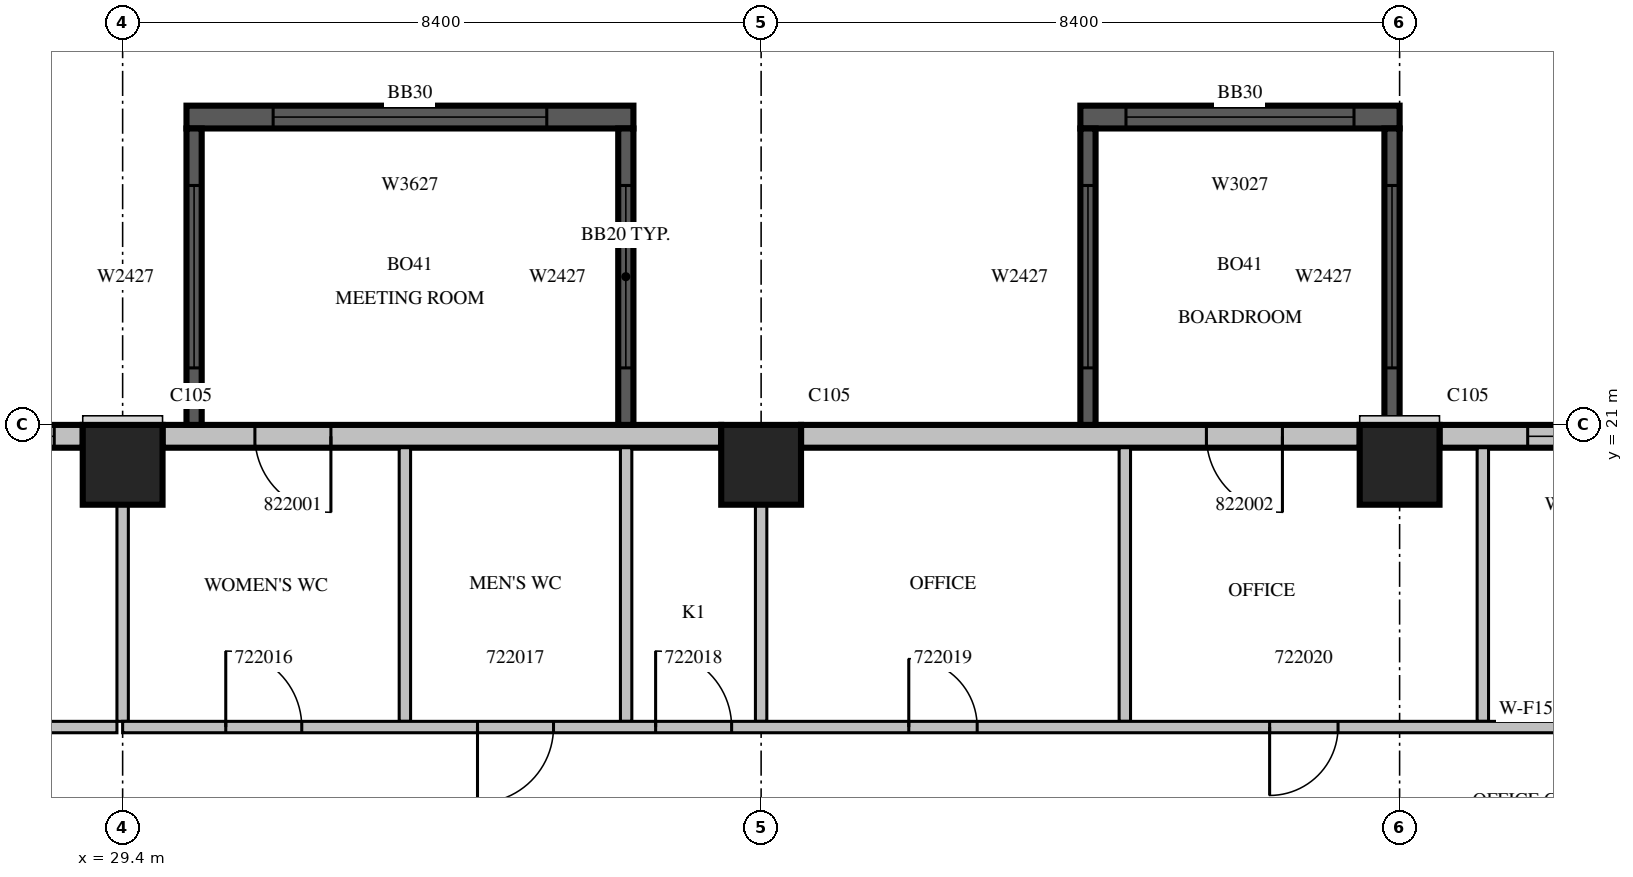
"""IFC4 building model, lengths in metres.
Left out: names, types, materials, properties, quantities, classifications, styles, units other than length and angle.
Written with IfcOpenShell. Run it as: python <this file> out.ifc"""

import sys

from ifc_helpers import new_model, si_unit, direction, frame, frame_2d, origin, origin_2d, place, context, subcontext, project, spatial, rectangle, extrude, source, transform, mapped, element, fill, save


model = new_model("IFC4")
c1 = context("Model", 3, precision=1e-05, world=origin(), true_north=direction((0.0, 1.0)))
c2 = subcontext(c1, "Body", "Model", "MODEL_VIEW")
j1 = project(units=[si_unit("LENGTHUNIT", "METRE"), si_unit("PLANEANGLEUNIT", "RADIAN")], contexts=[c1])
p1 = place(None, origin())
s1 = spatial("IfcSite", under=j1, at=p1, CompositionType="ELEMENT")
p2 = place(p1, origin())
s2 = spatial("IfcBuilding", under=s1, at=p2, CompositionType="ELEMENT")
p3 = place(p2, frame((0.0, 0.0, 103.5)))
s3 = spatial("IfcBuildingStorey", under=s2, at=p3, CompositionType="ELEMENT", Elevation=103.5)
m1 = source(origin(), c2, "Body", "SweptSolid", [
    extrude(rectangle(XDim=1.05, YDim=1.05, at=origin_2d()), origin(), (0.0, 0.0, 1.0), 4.2),
])
for number, where, z_axis, x_axis in (
    (1, (29.4, 20.475, 0.0), (0.0, 0.0, 1.0), (1.0, 0.0, 0.0)),
    (2, (37.8, 20.475, 0.0), (0.0, 0.0, 1.0), (1.0, 0.0, 0.0)),
    (3, (46.2, 20.475, 0.0), (0.0, 0.0, 1.0), (1.0, 0.0, 0.0)),
):
    element("IfcColumn", number, at=place(p3, frame(where, z_axis=z_axis, x_axis=x_axis)), inside=s3, PredefinedType="COLUMN", context=c2, shape_type="MappedRepresentation", body=[
        mapped(m1, transform((0.0, 0.0, 0.0), scale=1.0)),
    ])
m2 = source(origin(), c2, "Body", "SweptSolid", [
    extrude(rectangle(XDim=4.83, YDim=0.3, at=frame_2d((2.415, 0.0))), origin(), (0.0, 0.0, 1.0), 3.8),
])
p4 = place(p3, frame((51.555, 20.85, 0.0), z_axis=(0.0, 0.0, 1.0), x_axis=(-1.0, 0.0, 0.0)))
e4 = element("IfcWall", 4, at=p4, inside=s3, PredefinedType="STANDARD", context=c2, shape_type="MappedRepresentation", body=[
    mapped(m2, transform((0.0, 0.0, 0.0), scale=1.0)),
])
m3 = source(origin(), c2, "Body", "SweptSolid", [
    extrude(rectangle(XDim=1.2, YDim=2.7, at=frame_2d((0.6, 1.35))), frame((0.0, 0.16, 0.0), z_axis=(0.0, -1.0, 0.0), x_axis=(1.0, 0.0, 0.0)), (0.0, 0.0, 1.0), 0.32),
])
p5 = place(p4, frame((2.47, 0.0, 0.6)))
e5 = element("IfcOpeningElement", 5, at=p5, cuts=e4, PredefinedType="OPENING", context=c2, shape_type="MappedRepresentation", body=[
    mapped(m3, transform((0.0, 0.0, 0.0), scale=1.0)),
])
m4 = source(origin(), c2, "Body", "SweptSolid", [
    extrude(rectangle(XDim=7.35, YDim=0.3, at=frame_2d((3.675, 0.0))), origin(), (0.0, 0.0, 1.0), 3.8),
])
p6 = place(p3, frame((45.675, 20.85, 0.0), z_axis=(0.0, 0.0, 1.0), x_axis=(-1.0, 0.0, 0.0)))
e6 = element("IfcWall", 6, at=p6, inside=s3, PredefinedType="STANDARD", context=c2, shape_type="MappedRepresentation", body=[
    mapped(m4, transform((0.0, 0.0, 0.0), scale=1.0)),
])
m5 = source(origin(), c2, "Body", "SweptSolid", [
    extrude(rectangle(XDim=1.0, YDim=2.1, at=frame_2d((0.5, 1.05))), frame((0.0, 0.16, 0.0), z_axis=(0.0, -1.0, 0.0), x_axis=(1.0, 0.0, 0.0)), (0.0, 0.0, 1.0), 0.32),
])
p7 = place(p6, frame((1.017, 0.0, 0.0)))
e7 = element("IfcOpeningElement", 7, at=p7, cuts=e6, PredefinedType="OPENING", context=c2, shape_type="MappedRepresentation", body=[
    mapped(m5, transform((0.0, 0.0, 0.0), scale=1.0)),
])
p8 = place(p3, frame((37.275, 20.85, 0.0), z_axis=(0.0, 0.0, 1.0), x_axis=(-1.0, 0.0, 0.0)))
e8 = element("IfcWall", 8, at=p8, inside=s3, PredefinedType="STANDARD", context=c2, shape_type="MappedRepresentation", body=[
    mapped(m4, transform((0.0, 0.0, 0.0), scale=1.0)),
])
p9 = place(p8, frame((5.135, 0.0, 0.0)))
e9 = element("IfcOpeningElement", 9, at=p9, cuts=e8, PredefinedType="OPENING", context=c2, shape_type="MappedRepresentation", body=[
    mapped(m5, transform((0.0, 0.0, 0.0), scale=1.0)),
])
m6 = source(origin(), c2, "Body", "SweptSolid", [
    extrude(rectangle(XDim=6.875, YDim=0.3, at=frame_2d((3.438, 0.0))), origin(), (0.0, 0.0, 1.0), 3.8),
])
p10 = place(p3, frame((28.875, 20.85, 0.0), z_axis=(0.0, 0.0, 1.0), x_axis=(-1.0, 0.0, 0.0)))
e10 = element("IfcWall", 10, at=p10, inside=s3, PredefinedType="STANDARD", context=c2, shape_type="MappedRepresentation", body=[
    mapped(m6, transform((0.0, 0.0, 0.0), scale=1.0)),
])
m7 = source(origin(), c2, "Body", "SweptSolid", [
    extrude(rectangle(XDim=2.4, YDim=2.7, at=frame_2d((1.2, 1.35))), frame((0.0, 0.16, 0.0), z_axis=(0.0, -1.0, 0.0), x_axis=(1.0, 0.0, 0.0)), (0.0, 0.0, 1.0), 0.32),
])
p11 = place(p10, frame((0.375, 0.0, 0.6)))
e11 = element("IfcOpeningElement", 11, at=p11, cuts=e10, PredefinedType="OPENING", context=c2, shape_type="MappedRepresentation", body=[
    mapped(m7, transform((0.0, 0.0, 0.0), scale=1.0)),
])
m8 = source(origin(), c2, "Body", "SweptSolid", [
    extrude(rectangle(XDim=1.8, YDim=2.7, at=frame_2d((0.9, 1.35))), frame((0.0, 0.16, 0.0), z_axis=(0.0, -1.0, 0.0), x_axis=(1.0, 0.0, 0.0)), (0.0, 0.0, 1.0), 0.32),
])
p12 = place(p10, frame((3.938, 0.0, 0.6)))
e12 = element("IfcOpeningElement", 12, at=p12, cuts=e10, PredefinedType="OPENING", context=c2, shape_type="MappedRepresentation", body=[
    mapped(m8, transform((0.0, 0.0, 0.0), scale=1.0)),
])
m9 = source(origin(), c2, "Body", "SweptSolid", [
    extrude(rectangle(XDim=5.88, YDim=0.3, at=frame_2d((2.94, 0.0))), origin(), (0.0, 0.0, 1.0), 3.79),
])
p13 = place(p3, frame((36.12, 25.05, 0.0), z_axis=(0.0, 0.0, 1.0), x_axis=(-1.0, 0.0, 0.0)))
e13 = element("IfcWall", 13, at=p13, inside=s3, PredefinedType="SOLIDWALL", context=c2, shape_type="MappedRepresentation", body=[
    mapped(m9, transform((0.0, 0.0, 0.0), scale=1.0)),
])
m10 = source(origin(), c2, "Body", "SweptSolid", [
    extrude(rectangle(XDim=3.6, YDim=2.7, at=frame_2d((1.8, 1.35))), frame((0.0, 0.16, 0.0), z_axis=(0.0, -1.0, 0.0), x_axis=(1.0, 0.0, 0.0)), (0.0, 0.0, 1.0), 0.32),
])
p14 = place(p13, frame((1.14, 0.0, 0.6)))
e14 = element("IfcOpeningElement", 14, at=p14, cuts=e13, PredefinedType="OPENING", context=c2, shape_type="MappedRepresentation", body=[
    mapped(m10, transform((0.0, 0.0, 0.0), scale=1.0)),
])
m11 = source(origin(), c2, "Body", "SweptSolid", [
    extrude(rectangle(XDim=3.9, YDim=0.2, at=frame_2d((1.95, 0.0))), origin(), (0.0, 0.0, 1.0), 3.79),
])
p15 = place(p3, frame((36.02, 21.0, 0.0), z_axis=(0.0, 0.0, 1.0), x_axis=(0.0, 1.0, 0.0)))
e15 = element("IfcWall", 15, at=p15, inside=s3, PredefinedType="SOLIDWALL", context=c2, shape_type="MappedRepresentation", body=[
    mapped(m11, transform((0.0, 0.0, 0.0), scale=1.0)),
])
m12 = source(origin(), c2, "Body", "SweptSolid", [
    extrude(rectangle(XDim=2.4, YDim=2.7, at=frame_2d((1.2, 1.35))), frame((0.0, 0.11, 0.0), z_axis=(0.0, -1.0, 0.0), x_axis=(1.0, 0.0, 0.0)), (0.0, 0.0, 1.0), 0.22),
])
p16 = place(p15, frame((0.75, 0.0, 0.6)))
e16 = element("IfcOpeningElement", 16, at=p16, cuts=e15, PredefinedType="OPENING", context=c2, shape_type="MappedRepresentation", body=[
    mapped(m12, transform((0.0, 0.0, 0.0), scale=1.0)),
])
p17 = place(p3, frame((30.34, 21.0, 0.0), z_axis=(0.0, 0.0, 1.0), x_axis=(0.0, 1.0, 0.0)))
e17 = element("IfcWall", 17, at=p17, inside=s3, PredefinedType="SOLIDWALL", context=c2, shape_type="MappedRepresentation", body=[
    mapped(m11, transform((0.0, 0.0, 0.0), scale=1.0)),
])
p18 = place(p17, frame((0.75, 0.0, 0.6)))
e18 = element("IfcOpeningElement", 18, at=p18, cuts=e17, PredefinedType="OPENING", context=c2, shape_type="MappedRepresentation", body=[
    mapped(m12, transform((0.0, 0.0, 0.0), scale=1.0)),
])
m13 = source(origin(), c2, "Body", "SweptSolid", [
    extrude(rectangle(XDim=4.2, YDim=0.3, at=frame_2d((2.1, 0.0))), origin(), (0.0, 0.0, 1.0), 3.79),
])
p19 = place(p3, frame((46.2, 25.05, 0.0), z_axis=(0.0, 0.0, 1.0), x_axis=(-1.0, 0.0, 0.0)))
e19 = element("IfcWall", 19, at=p19, inside=s3, PredefinedType="SOLIDWALL", context=c2, shape_type="MappedRepresentation", body=[
    mapped(m13, transform((0.0, 0.0, 0.0), scale=1.0)),
])
m14 = source(origin(), c2, "Body", "SweptSolid", [
    extrude(rectangle(XDim=3.0, YDim=2.7, at=frame_2d((1.5, 1.35))), frame((0.0, 0.16, 0.0), z_axis=(0.0, -1.0, 0.0), x_axis=(1.0, 0.0, 0.0)), (0.0, 0.0, 1.0), 0.32),
])
p20 = place(p19, frame((0.6, 0.0, 0.6)))
e20 = element("IfcOpeningElement", 20, at=p20, cuts=e19, PredefinedType="OPENING", context=c2, shape_type="MappedRepresentation", body=[
    mapped(m14, transform((0.0, 0.0, 0.0), scale=1.0)),
])
p21 = place(p3, frame((46.1, 21.0, 0.0), z_axis=(0.0, 0.0, 1.0), x_axis=(0.0, 1.0, 0.0)))
e21 = element("IfcWall", 21, at=p21, inside=s3, PredefinedType="SOLIDWALL", context=c2, shape_type="MappedRepresentation", body=[
    mapped(m11, transform((0.0, 0.0, 0.0), scale=1.0)),
])
p22 = place(p21, frame((0.75, 0.0, 0.6)))
e22 = element("IfcOpeningElement", 22, at=p22, cuts=e21, PredefinedType="OPENING", context=c2, shape_type="MappedRepresentation", body=[
    mapped(m12, transform((0.0, 0.0, 0.0), scale=1.0)),
])
p23 = place(p3, frame((42.1, 21.0, 0.0), z_axis=(0.0, 0.0, 1.0), x_axis=(0.0, 1.0, 0.0)))
e23 = element("IfcWall", 23, at=p23, inside=s3, PredefinedType="SOLIDWALL", context=c2, shape_type="MappedRepresentation", body=[
    mapped(m11, transform((0.0, 0.0, 0.0), scale=1.0)),
])
p24 = place(p23, frame((0.75, 0.0, 0.6)))
e24 = element("IfcOpeningElement", 24, at=p24, cuts=e23, PredefinedType="OPENING", context=c2, shape_type="MappedRepresentation", body=[
    mapped(m12, transform((0.0, 0.0, 0.0), scale=1.0)),
])
m15 = source(origin(), c2, "Body", "SweptSolid", [
    extrude(rectangle(XDim=3.85, YDim=0.15, at=frame_2d((1.925, 0.0))), origin(), (0.0, 0.0, 1.0), 3.8),
])
p25 = place(p3, frame((25.475, 17.025, 0.0), z_axis=(0.0, 0.0, 1.0), x_axis=(1.0, 0.0, 0.0)))
e25 = element("IfcWall", 25, at=p25, inside=s3, PredefinedType="PARTITIONING", context=c2, shape_type="MappedRepresentation", body=[
    mapped(m15, transform((0.0, 0.0, 0.0), scale=1.0)),
])
p26 = place(p3, frame((29.4, 17.1, 0.0), z_axis=(0.0, 0.0, 1.0), x_axis=(0.0, 1.0, 0.0)))
e26 = element("IfcWall", 26, at=p26, inside=s3, PredefinedType="PARTITIONING", context=c2, shape_type="SweptSolid", body=[
    extrude(rectangle(XDim=2.851, YDim=0.15, at=frame_2d((1.425, 0.0))), origin(), (0.0, 0.0, 1.0), 3.8),
])
m16 = source(origin(), c2, "Body", "SweptSolid", [
    extrude(rectangle(XDim=3.6, YDim=0.15, at=frame_2d((1.8, 0.0))), origin(), (0.0, 0.0, 1.0), 3.8),
])
for number, where, z_axis, x_axis in (
    (27, (33.113, 20.7, 0.0), (0.0, 0.0, 1.0), (0.0, -1.0, 0.0)),
    (28, (36.024, 20.7, 0.0), (0.0, 0.0, 1.0), (0.0, -1.0, 0.0)),
    (29, (42.585, 20.7, 0.0), (0.0, 0.0, 1.0), (0.0, -1.0, 0.0)),
    (30, (47.295, 20.7, 0.0), (0.0, 0.0, 1.0), (0.0, -1.0, 0.0)),
):
    element("IfcWall", number, at=place(p3, frame(where, z_axis=z_axis, x_axis=x_axis)), inside=s3, PredefinedType="PARTITIONING", context=c2, shape_type="MappedRepresentation", body=[
        mapped(m16, transform((0.0, 0.0, 0.0), scale=1.0)),
    ])
m17 = source(origin(), c2, "Body", "SweptSolid", [
    extrude(rectangle(XDim=2.851, YDim=0.15, at=frame_2d((1.425, 0.0))), origin(), (0.0, 0.0, 1.0), 3.8),
])
p27 = place(p3, frame((37.8, 17.1, 0.0), z_axis=(0.0, 0.0, 1.0), x_axis=(0.0, 1.0, 0.0)))
e31 = element("IfcWall", 31, at=p27, inside=s3, PredefinedType="PARTITIONING", context=c2, shape_type="MappedRepresentation", body=[
    mapped(m17, transform((0.0, 0.0, 0.0), scale=1.0)),
])
m18 = source(origin(), c2, "Body", "SweptSolid", [
    extrude(rectangle(XDim=37.5, YDim=0.15, at=frame_2d((18.75, 0.0))), origin(), (0.0, 0.0, 1.0), 3.8),
])
p28 = place(p3, frame((29.4, 17.025, 0.0), z_axis=(0.0, 0.0, 1.0), x_axis=(1.0, 0.0, 0.0)))
e32 = element("IfcWall", 32, at=p28, inside=s3, PredefinedType="PARTITIONING", context=c2, shape_type="MappedRepresentation", body=[
    mapped(m18, transform((0.0, 0.0, 0.0), scale=1.0)),
])
m19 = source(origin(), c2, "Body", "SweptSolid", [
    extrude(rectangle(XDim=1.0, YDim=2.1, at=frame_2d((0.5, 1.05))), frame((0.0, 0.085, 0.0), z_axis=(0.0, -1.0, 0.0), x_axis=(1.0, 0.0, 0.0)), (0.0, 0.0, 1.0), 0.17),
])
p29 = place(p28, frame((1.357, 0.0, 0.0)))
e33 = element("IfcOpeningElement", 33, at=p29, cuts=e32, PredefinedType="OPENING", context=c2, shape_type="MappedRepresentation", body=[
    mapped(m19, transform((0.0, 0.0, 0.0), scale=1.0)),
])
p30 = place(p28, frame((4.669, 0.0, 0.0)))
e34 = element("IfcOpeningElement", 34, at=p30, cuts=e32, PredefinedType="OPENING", context=c2, shape_type="MappedRepresentation", body=[
    mapped(m19, transform((0.0, 0.0, 0.0), scale=1.0)),
])
p31 = place(p28, frame((7.012, 0.0, 0.0)))
e35 = element("IfcOpeningElement", 35, at=p31, cuts=e32, PredefinedType="OPENING", context=c2, shape_type="MappedRepresentation", body=[
    mapped(m19, transform((0.0, 0.0, 0.0), scale=1.0)),
])
m20 = source(origin(), c2, "Body", "SweptSolid", [
    extrude(rectangle(XDim=0.9, YDim=2.1, at=frame_2d((0.45, 1.05))), frame((0.0, 0.085, 0.0), z_axis=(0.0, -1.0, 0.0), x_axis=(1.0, 0.0, 0.0)), (0.0, 0.0, 1.0), 0.17),
])
p32 = place(p28, frame((10.342, 0.0, 0.0)))
e36 = element("IfcOpeningElement", 36, at=p32, cuts=e32, PredefinedType="OPENING", context=c2, shape_type="MappedRepresentation", body=[
    mapped(m20, transform((0.0, 0.0, 0.0), scale=1.0)),
])
p33 = place(p28, frame((15.09, 0.0, 0.0)))
e37 = element("IfcOpeningElement", 37, at=p33, cuts=e32, PredefinedType="OPENING", context=c2, shape_type="MappedRepresentation", body=[
    mapped(m20, transform((0.0, 0.0, 0.0), scale=1.0)),
])
p34 = place(p28, frame((19.837, 0.0, 0.0)))
e38 = element("IfcOpeningElement", 38, at=p34, cuts=e32, PredefinedType="OPENING", context=c2, shape_type="MappedRepresentation", body=[
    mapped(m20, transform((0.0, 0.0, 0.0), scale=1.0)),
])
m21 = source(origin(), c2, "Body", "SweptSolid", [
    extrude(rectangle(XDim=1.2, YDim=2.1, at=frame_2d((0.6, 1.05))), frame((0.0, 0.085, 0.0), z_axis=(0.0, -1.0, 0.0), x_axis=(1.0, 0.0, 0.0)), (0.0, 0.0, 1.0), 0.17),
])
p35 = place(p28, frame((25.804, 0.0, 0.0)))
e39 = element("IfcOpeningElement", 39, at=p35, cuts=e32, PredefinedType="OPENING", context=c2, shape_type="MappedRepresentation", body=[
    mapped(m21, transform((0.0, 0.0, 0.0), scale=1.0)),
])
p36 = place(p28, frame((33.251, 0.0, 0.0)))
e40 = element("IfcOpeningElement", 40, at=p36, cuts=e32, PredefinedType="OPENING", context=c2, shape_type="MappedRepresentation", body=[
    mapped(m21, transform((0.0, 0.0, 0.0), scale=1.0)),
])
m22 = source(origin(), c2, "Body", "SweptSolid", [
    extrude(rectangle(XDim=1.2, YDim=2.7, at=frame_2d((0.6, 1.35))), frame((0.0, 0.03, 0.0), z_axis=(0.0, -1.0, 0.0), x_axis=(1.0, 0.0, 0.0)), (0.0, 0.0, 1.0), 0.06),
])
p37 = place(p5, origin())
e41 = element("IfcWindow", 41, at=p37, inside=s3, PartitioningType="SINGLE_PANEL", PredefinedType="WINDOW", context=c2, shape_type="MappedRepresentation", body=[
    mapped(m22, transform((0.0, 0.0, 0.0), scale=1.0)),
])
fill(e5, e41)
m23 = source(origin(), c2, "Body", "SweptSolid", [
    extrude(rectangle(XDim=2.4, YDim=2.7, at=frame_2d((1.2, 1.35))), frame((0.0, 0.03, 0.0), z_axis=(0.0, -1.0, 0.0), x_axis=(1.0, 0.0, 0.0)), (0.0, 0.0, 1.0), 0.06),
])
p38 = place(p11, origin())
e42 = element("IfcWindow", 42, at=p38, inside=s3, PartitioningType="SINGLE_PANEL", PredefinedType="WINDOW", context=c2, shape_type="MappedRepresentation", body=[
    mapped(m23, transform((0.0, 0.0, 0.0), scale=1.0)),
])
fill(e11, e42)
m24 = source(origin(), c2, "Body", "SweptSolid", [
    extrude(rectangle(XDim=3.6, YDim=2.7, at=frame_2d((1.8, 1.35))), frame((0.0, 0.03, 0.0), z_axis=(0.0, -1.0, 0.0), x_axis=(1.0, 0.0, 0.0)), (0.0, 0.0, 1.0), 0.06),
])
p39 = place(p14, origin())
e43 = element("IfcWindow", 43, at=p39, inside=s3, PartitioningType="SINGLE_PANEL", PredefinedType="WINDOW", context=c2, shape_type="MappedRepresentation", body=[
    mapped(m24, transform((0.0, 0.0, 0.0), scale=1.0)),
])
fill(e14, e43)
p40 = place(p16, origin())
e44 = element("IfcWindow", 44, at=p40, inside=s3, PartitioningType="SINGLE_PANEL", PredefinedType="WINDOW", context=c2, shape_type="MappedRepresentation", body=[
    mapped(m23, transform((0.0, 0.0, 0.0), scale=1.0)),
])
fill(e16, e44)
p41 = place(p18, origin())
e45 = element("IfcWindow", 45, at=p41, inside=s3, PartitioningType="SINGLE_PANEL", PredefinedType="WINDOW", context=c2, shape_type="MappedRepresentation", body=[
    mapped(m23, transform((0.0, 0.0, 0.0), scale=1.0)),
])
fill(e18, e45)
m25 = source(origin(), c2, "Body", "SweptSolid", [
    extrude(rectangle(XDim=3.0, YDim=2.7, at=frame_2d((1.5, 1.35))), frame((0.0, 0.03, 0.0), z_axis=(0.0, -1.0, 0.0), x_axis=(1.0, 0.0, 0.0)), (0.0, 0.0, 1.0), 0.06),
])
p42 = place(p20, origin())
e46 = element("IfcWindow", 46, at=p42, inside=s3, PartitioningType="SINGLE_PANEL", PredefinedType="WINDOW", context=c2, shape_type="MappedRepresentation", body=[
    mapped(m25, transform((0.0, 0.0, 0.0), scale=1.0)),
])
fill(e20, e46)
p43 = place(p22, origin())
e47 = element("IfcWindow", 47, at=p43, inside=s3, PartitioningType="SINGLE_PANEL", PredefinedType="WINDOW", context=c2, shape_type="MappedRepresentation", body=[
    mapped(m23, transform((0.0, 0.0, 0.0), scale=1.0)),
])
fill(e22, e47)
p44 = place(p24, origin())
e48 = element("IfcWindow", 48, at=p44, inside=s3, PartitioningType="SINGLE_PANEL", PredefinedType="WINDOW", context=c2, shape_type="MappedRepresentation", body=[
    mapped(m23, transform((0.0, 0.0, 0.0), scale=1.0)),
])
fill(e24, e48)
m26 = source(origin(), c2, "Body", "SweptSolid", [
    extrude(rectangle(XDim=1.0, YDim=2.1, at=frame_2d((0.5, 1.05))), frame((0.0, 0.025, 0.0), z_axis=(0.0, -1.0, 0.0), x_axis=(1.0, 0.0, 0.0)), (0.0, 0.0, 1.0), 0.05),
])
p45 = place(p29, origin())
e49 = element("IfcDoor", 49, at=p45, inside=s3, OperationType="SINGLE_SWING_LEFT", PredefinedType="DOOR", context=c2, shape_type="MappedRepresentation", body=[
    mapped(m26, transform((0.0, 0.0, 0.0), scale=1.0)),
])
fill(e33, e49)
p46 = place(p30, origin())
e50 = element("IfcDoor", 50, at=p46, inside=s3, OperationType="SINGLE_SWING_RIGHT", PredefinedType="DOOR", context=c2, shape_type="MappedRepresentation", body=[
    mapped(m26, transform((0.0, 0.0, 0.0), scale=1.0)),
])
fill(e34, e50)
p47 = place(p31, origin())
e51 = element("IfcDoor", 51, at=p47, inside=s3, OperationType="SINGLE_SWING_LEFT", PredefinedType="DOOR", context=c2, shape_type="MappedRepresentation", body=[
    mapped(m26, transform((0.0, 0.0, 0.0), scale=1.0)),
])
fill(e35, e51)
m27 = source(origin(), c2, "Body", "SweptSolid", [
    extrude(rectangle(XDim=0.9, YDim=2.1, at=frame_2d((0.45, 1.05))), frame((0.0, 0.025, 0.0), z_axis=(0.0, -1.0, 0.0), x_axis=(1.0, 0.0, 0.0)), (0.0, 0.0, 1.0), 0.05),
])
p48 = place(p32, origin())
e52 = element("IfcDoor", 52, at=p48, inside=s3, OperationType="SINGLE_SWING_LEFT", PredefinedType="DOOR", context=c2, shape_type="MappedRepresentation", body=[
    mapped(m27, transform((0.0, 0.0, 0.0), scale=1.0)),
])
fill(e36, e52)
p49 = place(p33, origin())
e53 = element("IfcDoor", 53, at=p49, inside=s3, OperationType="SINGLE_SWING_RIGHT", PredefinedType="DOOR", context=c2, shape_type="MappedRepresentation", body=[
    mapped(m27, transform((0.0, 0.0, 0.0), scale=1.0)),
])
fill(e37, e53)
p50 = place(p9, origin())
e54 = element("IfcDoor", 54, at=p50, inside=s3, OperationType="SINGLE_SWING_LEFT", PredefinedType="DOOR", context=c2, shape_type="MappedRepresentation", body=[
    mapped(m26, transform((0.0, 0.0, 0.0), scale=1.0)),
])
fill(e9, e54)
p51 = place(p7, origin())
e55 = element("IfcDoor", 55, at=p51, inside=s3, OperationType="SINGLE_SWING_LEFT", PredefinedType="DOOR", context=c2, shape_type="MappedRepresentation", body=[
    mapped(m26, transform((0.0, 0.0, 0.0), scale=1.0)),
])
fill(e7, e55)
save(model, sys.argv[1])
